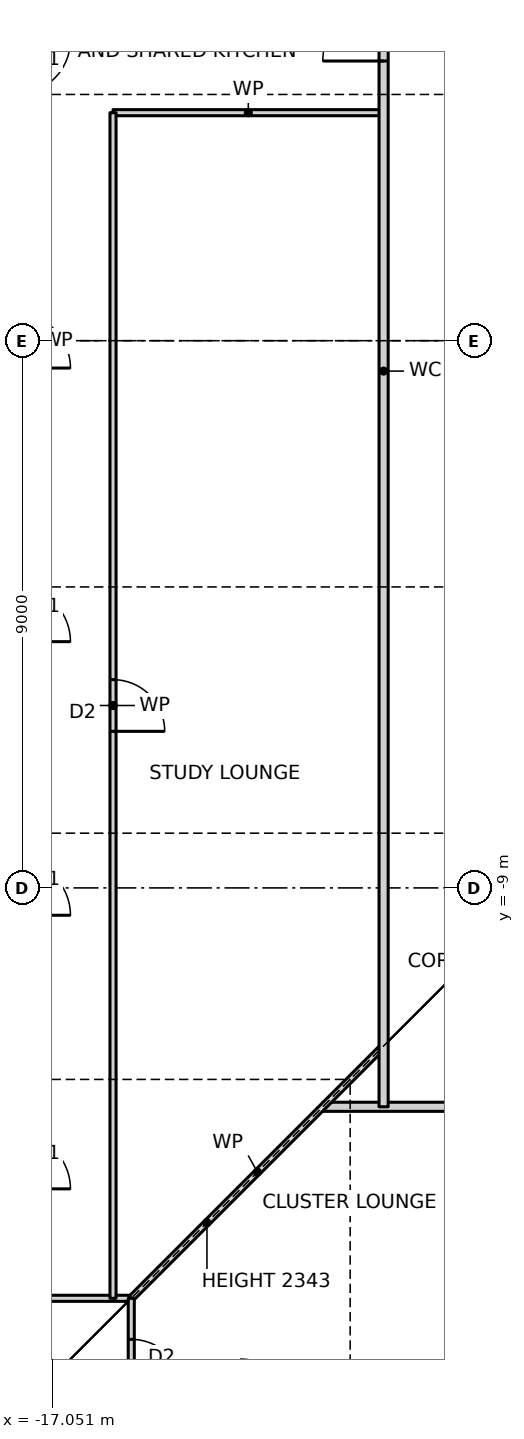
"""IFC4 building model, lengths in metres.
Left out: names, types, materials, properties, quantities, classifications, styles, units other than length and angle.
Written with IfcOpenShell. Run it as: python <this file> out.ifc"""

import sys

from ifc_helpers import new_model, si_unit, direction, frame, frame_2d, origin, place, context, subcontext, project, spatial, rectangle, extrude, element, fill, save


model = new_model("IFC4")
c1 = context("Model", 3, precision=1e-05, world=origin(), true_north=direction((0.0, 1.0)))
c2 = subcontext(c1, "Body", "Model", "MODEL_VIEW")
j1 = project(units=[si_unit("LENGTHUNIT", "METRE"), si_unit("PLANEANGLEUNIT", "RADIAN")], contexts=[c1])
p1 = place(None, origin())
s1 = spatial("IfcSite", under=j1, at=p1, CompositionType="ELEMENT")
p2 = place(p1, origin())
s2 = spatial("IfcBuilding", under=s1, at=p2, CompositionType="ELEMENT")
p3 = place(p2, frame((0.0, 0.0, 15.0)))
s3 = spatial("IfcBuildingStorey", under=s2, at=p3, CompositionType="ELEMENT", Elevation=15.0)
p4 = place(p3, frame((-23.19, -15.75, 0.0), z_axis=(0.0, 0.0, 1.0), x_axis=(1.0, 0.0, 0.0)))
e1 = element("IfcWall", 1, at=p4, inside=s3, PredefinedType="PARTITIONING", context=c2, shape_type="SweptSolid", body=[
    extrude(rectangle(XDim=7.44, YDim=0.1, at=frame_2d((3.72, 0.0))), origin(), (0.0, 0.0, 1.0), 3.27),
])
p5 = place(p3, frame((-12.6, -12.6, 0.0), z_axis=(0.0, 0.0, 1.0), x_axis=(1.0, 0.0, 0.0)))
e2 = element("IfcWall", 2, at=p5, inside=s3, PredefinedType="PARTITIONING", context=c2, shape_type="SweptSolid", body=[
    extrude(rectangle(XDim=25.2, YDim=0.15, at=frame_2d((12.6, 0.0))), origin(), (0.0, 0.0, 1.0), 3.27),
])
p6 = place(p5, frame((21.05, 0.0, 0.0)))
e3 = element("IfcOpeningElement", 3, at=p6, cuts=e2, PredefinedType="OPENING", context=c2, shape_type="SweptSolid", body=[
    extrude(rectangle(XDim=1.0, YDim=2.1, at=frame_2d((0.5, 1.05))), frame((0.0, 0.085, 0.0), z_axis=(0.0, -1.0, 0.0), x_axis=(1.0, 0.0, 0.0)), (0.0, 0.0, 1.0), 0.17),
])
p7 = place(p3, frame((-16.05, 3.75, 0.0), z_axis=(0.0, 0.0, 1.0), x_axis=(1.0, 0.0, 0.0)))
e4 = element("IfcWall", 4, at=p7, inside=s3, PredefinedType="PARTITIONING", context=c2, shape_type="SweptSolid", body=[
    extrude(rectangle(XDim=4.45, YDim=0.1, at=frame_2d((2.225, 0.0))), origin(), (0.0, 0.0, 1.0), 3.27),
])
p8 = place(p3, frame((-15.75, -15.75, 0.0), z_axis=(0.0, 0.0, 1.0), x_axis=(0.707106781187, 0.707106781187, 0.0)))
e5 = element("IfcWall", 5, at=p8, inside=s3, PredefinedType="PARTITIONING", context=c2, shape_type="SweptSolid", body=[
    extrude(rectangle(XDim=5.869, YDim=0.1, at=frame_2d((2.935, 0.0))), origin(), (0.0, 0.0, 1.0), 2.343),
])
p9 = place(p3, frame((-11.6, -12.6, 0.0), z_axis=(0.0, 0.0, 1.0), x_axis=(0.0, 1.0, 0.0)))
e6 = element("IfcWall", 6, at=p9, inside=s3, PredefinedType="PARTITIONING", context=c2, shape_type="SweptSolid", body=[
    extrude(rectangle(XDim=24.2, YDim=0.15, at=frame_2d((12.1, 0.0))), origin(), (0.0, 0.0, 1.0), 3.27),
])
p10 = place(p9, frame((17.2, 0.0, 0.0)))
e7 = element("IfcOpeningElement", 7, at=p10, cuts=e6, PredefinedType="OPENING", context=c2, shape_type="SweptSolid", body=[
    extrude(rectangle(XDim=1.0, YDim=2.1, at=frame_2d((0.5, 1.05))), frame((0.0, 0.085, 0.0), z_axis=(0.0, -1.0, 0.0), x_axis=(1.0, 0.0, 0.0)), (0.0, 0.0, 1.0), 0.17),
])
p11 = place(p9, frame((19.5, 0.0, 0.0)))
e8 = element("IfcOpeningElement", 8, at=p11, cuts=e6, PredefinedType="OPENING", context=c2, shape_type="SweptSolid", body=[
    extrude(rectangle(XDim=0.9, YDim=2.1, at=frame_2d((0.45, 1.05))), frame((0.0, 0.085, 0.0), z_axis=(0.0, -1.0, 0.0), x_axis=(1.0, 0.0, 0.0)), (0.0, 0.0, 1.0), 0.17),
])
p12 = place(p3, frame((-15.75, -23.19, 0.0), z_axis=(0.0, 0.0, 1.0), x_axis=(0.0, 1.0, 0.0)))
e9 = element("IfcWall", 9, at=p12, inside=s3, PredefinedType="PARTITIONING", context=c2, shape_type="SweptSolid", body=[
    extrude(rectangle(XDim=7.44, YDim=0.1, at=frame_2d((3.72, 0.0))), origin(), (0.0, 0.0, 1.0), 3.27),
])
p13 = place(p12, frame((5.915, 0.0, 0.0)))
e10 = element("IfcOpeningElement", 10, at=p13, cuts=e9, PredefinedType="OPENING", context=c2, shape_type="SweptSolid", body=[
    extrude(rectangle(XDim=0.85, YDim=2.1, at=frame_2d((0.425, 1.05))), frame((0.0, 0.06, 0.0), z_axis=(0.0, -1.0, 0.0), x_axis=(1.0, 0.0, 0.0)), (0.0, 0.0, 1.0), 0.12),
])
p14 = place(p3, frame((-16.05, -15.75, 0.0), z_axis=(0.0, 0.0, 1.0), x_axis=(0.0, 1.0, 0.0)))
e11 = element("IfcWall", 11, at=p14, inside=s3, PredefinedType="PARTITIONING", context=c2, shape_type="SweptSolid", body=[
    extrude(rectangle(XDim=19.5, YDim=0.1, at=frame_2d((9.75, 0.0))), origin(), (0.0, 0.0, 1.0), 3.27),
])
p15 = place(p14, frame((9.325, 0.0, 0.0)))
e12 = element("IfcOpeningElement", 12, at=p15, cuts=e11, PredefinedType="OPENING", context=c2, shape_type="SweptSolid", body=[
    extrude(rectangle(XDim=0.85, YDim=2.1, at=frame_2d((0.425, 1.05))), frame((0.0, 0.06, 0.0), z_axis=(0.0, -1.0, 0.0), x_axis=(1.0, 0.0, 0.0)), (0.0, 0.0, 1.0), 0.12),
])
p16 = place(p10, origin())
e13 = element("IfcDoor", 13, at=p16, inside=s3, OperationType="SINGLE_SWING_LEFT", PredefinedType="DOOR", context=c2, shape_type="SweptSolid", body=[
    extrude(rectangle(XDim=1.0, YDim=2.1, at=frame_2d((0.5, 1.05))), frame((0.0, 0.025, 0.0), z_axis=(0.0, -1.0, 0.0), x_axis=(1.0, 0.0, 0.0)), (0.0, 0.0, 1.0), 0.05),
])
fill(e7, e13)
p17 = place(p15, frame((0.85, 0.0, 0.0), z_axis=(0.0, 0.0, 1.0), x_axis=(-1.0, 0.0, 0.0)))
e14 = element("IfcDoor", 14, at=p17, inside=s3, OperationType="SINGLE_SWING_RIGHT", PredefinedType="DOOR", context=c2, shape_type="SweptSolid", body=[
    extrude(rectangle(XDim=0.85, YDim=2.1, at=frame_2d((0.425, 1.05))), frame((0.0, 0.025, 0.0), z_axis=(0.0, -1.0, 0.0), x_axis=(1.0, 0.0, 0.0)), (0.0, 0.0, 1.0), 0.05),
])
fill(e12, e14)
p18 = place(p13, frame((0.85, 0.0, 0.0), z_axis=(0.0, 0.0, 1.0), x_axis=(-1.0, 0.0, 0.0)))
e15 = element("IfcDoor", 15, at=p18, inside=s3, OperationType="SINGLE_SWING_RIGHT", PredefinedType="DOOR", context=c2, shape_type="SweptSolid", body=[
    extrude(rectangle(XDim=0.85, YDim=2.1, at=frame_2d((0.425, 1.05))), frame((0.0, 0.025, 0.0), z_axis=(0.0, -1.0, 0.0), x_axis=(1.0, 0.0, 0.0)), (0.0, 0.0, 1.0), 0.05),
])
fill(e10, e15)
save(model, sys.argv[1])
